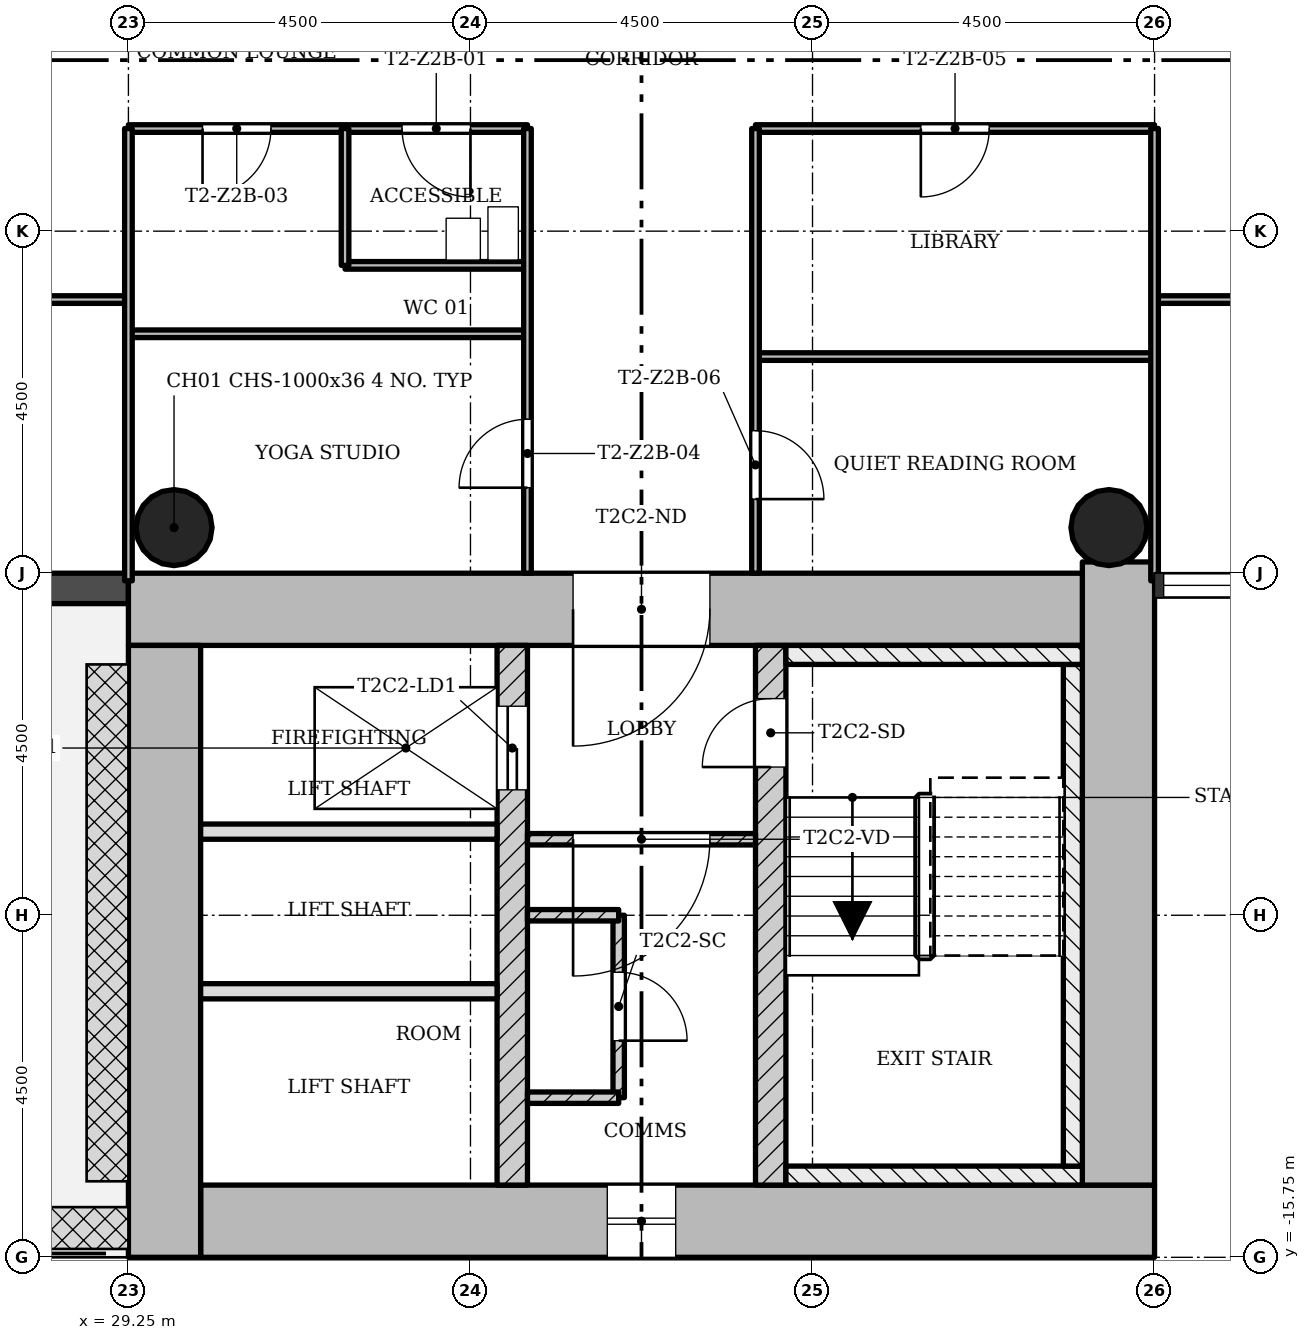
"""IFC4 building model, lengths in metres.
Left out: names, types, materials, properties, quantities, classifications, styles, units other than length and angle.
Written with IfcOpenShell. Run it as: python <this file> out.ifc"""

import sys

from ifc_helpers import new_model, si_unit, direction, frame, frame_2d, origin, origin_2d, place, context, subcontext, project, spatial, rectangle, hollow_circle, extrude, element, fill, save


model = new_model("IFC4")
c1 = context("Model", 3, precision=1e-05, world=origin(), true_north=direction((0.0, 1.0)))
c2 = subcontext(c1, "Body", "Model", "MODEL_VIEW")
j1 = project(units=[si_unit("LENGTHUNIT", "METRE"), si_unit("PLANEANGLEUNIT", "RADIAN")], contexts=[c1])
p1 = place(None, origin())
s1 = spatial("IfcSite", under=j1, at=p1, CompositionType="ELEMENT")
p2 = place(p1, origin())
s2 = spatial("IfcBuilding", under=s1, at=p2, CompositionType="ELEMENT")
p3 = place(p2, frame((0.0, 0.0, 83.4)))
s3 = spatial("IfcBuildingStorey", under=s2, at=p3, CompositionType="ELEMENT", Elevation=83.4)
p4 = place(p3, frame((30.2, -15.275, 0.0), z_axis=(0.0, 0.0, 1.0), x_axis=(1.0, 0.0, 0.0)))
e1 = element("IfcWall", 1, at=p4, inside=s3, PredefinedType="SHEAR", context=c2, shape_type="SweptSolid", body=[
    extrude(rectangle(XDim=12.55, YDim=0.95, at=frame_2d((6.275, 0.0))), origin(), (0.0, 0.0, 1.0), 3.4),
])
p5 = place(p4, frame((5.35, 0.0, 0.45)))
e2 = element("IfcOpeningElement", 2, at=p5, cuts=e1, PredefinedType="OPENING", context=c2, shape_type="SweptSolid", body=[
    extrude(rectangle(XDim=0.9, YDim=2.4, at=frame_2d((0.45, 1.2))), frame((0.0, 0.485, 0.0), z_axis=(0.0, -1.0, 0.0), x_axis=(1.0, 0.0, 0.0)), (0.0, 0.0, 1.0), 0.97),
])
p6 = place(p3, frame((42.275, -14.8, 0.0), z_axis=(0.0, 0.0, 1.0), x_axis=(0.0, 1.0, 0.0)))
e3 = element("IfcWall", 3, at=p6, inside=s3, PredefinedType="SHEAR", context=c2, shape_type="SweptSolid", body=[
    extrude(rectangle(XDim=8.198, YDim=0.95, at=frame_2d((4.099, 0.0))), origin(), (0.0, 0.0, 1.0), 3.4),
])
p7 = place(p3, frame((41.8, -7.225, 0.0), z_axis=(0.0, 0.0, 1.0), x_axis=(-1.0, 0.0, 0.0)))
e4 = element("IfcWall", 4, at=p7, inside=s3, PredefinedType="SHEAR", context=c2, shape_type="SweptSolid", body=[
    extrude(rectangle(XDim=12.55, YDim=0.95, at=frame_2d((6.275, 0.0))), origin(), (0.0, 0.0, 1.0), 3.4),
])
p8 = place(p7, frame((4.9, 0.0, 0.0)))
e5 = element("IfcOpeningElement", 5, at=p8, cuts=e4, PredefinedType="OPENING", context=c2, shape_type="SweptSolid", body=[
    extrude(rectangle(XDim=1.8, YDim=2.1, at=frame_2d((0.9, 1.05))), frame((0.0, 0.485, 0.0), z_axis=(0.0, -1.0, 0.0), x_axis=(1.0, 0.0, 0.0)), (0.0, 0.0, 1.0), 0.97),
])
p9 = place(p3, frame((29.725, -7.7, 0.0), z_axis=(0.0, 0.0, 1.0), x_axis=(0.0, -1.0, 0.0)))
e6 = element("IfcWall", 6, at=p9, inside=s3, PredefinedType="SHEAR", context=c2, shape_type="SweptSolid", body=[
    extrude(rectangle(XDim=8.05, YDim=0.95, at=frame_2d((4.025, 0.0))), origin(), (0.0, 0.0, 1.0), 3.4),
])
p10 = place(p3, frame((34.3, -14.8, 0.0), z_axis=(0.0, 0.0, 1.0), x_axis=(0.0, 1.0, 0.0)))
e7 = element("IfcWall", 7, at=p10, inside=s3, PredefinedType="SHEAR", context=c2, shape_type="SweptSolid", body=[
    extrude(rectangle(XDim=7.1, YDim=0.4, at=frame_2d((3.55, 0.0))), origin(), (0.0, 0.0, 1.0), 3.4),
])
p11 = place(p10, frame((5.2, 0.0, 0.0)))
e8 = element("IfcOpeningElement", 8, at=p11, cuts=e7, PredefinedType="OPENING", context=c2, shape_type="SweptSolid", body=[
    extrude(rectangle(XDim=1.1, YDim=2.1, at=frame_2d((0.55, 1.05))), frame((0.0, 0.21, 0.0), z_axis=(0.0, -1.0, 0.0), x_axis=(1.0, 0.0, 0.0)), (0.0, 0.0, 1.0), 0.42),
])
p12 = place(p3, frame((37.7, -14.8, 0.0), z_axis=(0.0, 0.0, 1.0), x_axis=(0.0, 1.0, 0.0)))
e9 = element("IfcWall", 9, at=p12, inside=s3, PredefinedType="SHEAR", context=c2, shape_type="SweptSolid", body=[
    extrude(rectangle(XDim=7.1, YDim=0.4, at=frame_2d((3.55, 0.0))), origin(), (0.0, 0.0, 1.0), 3.4),
])
p13 = place(p12, frame((5.5, 0.0, 0.0)))
e10 = element("IfcOpeningElement", 10, at=p13, cuts=e9, PredefinedType="OPENING", context=c2, shape_type="SweptSolid", body=[
    extrude(rectangle(XDim=0.9, YDim=2.1, at=frame_2d((0.45, 1.05))), frame((0.0, 0.21, 0.0), z_axis=(0.0, -1.0, 0.0), x_axis=(1.0, 0.0, 0.0)), (0.0, 0.0, 1.0), 0.42),
])
for number, where, z_axis, x_axis in (
    (11, (42.15, -6.15, 0.0), (0.0, 0.0, 1.0), (1.0, 0.0, 0.0)),
    (12, (29.85, -6.15, 0.0), (0.0, 0.0, 1.0), (1.0, 0.0, 0.0)),
):
    element("IfcColumn", number, at=place(p3, frame(where, z_axis=z_axis, x_axis=x_axis)), inside=s3, PredefinedType="COLUMN", context=c2, shape_type="SweptSolid", body=[
        extrude(hollow_circle(Radius=0.5, WallThickness=0.036, at=origin_2d()), origin(), (0.0, 0.0, 1.0), 3.4),
    ])
p14 = place(p3, frame((24.75, -6.95, -0.02), z_axis=(0.0, 0.0, 1.0), x_axis=(1.0, 0.0, 0.0)))
e13 = element("IfcWall", 13, at=p14, inside=s3, PredefinedType="STANDARD", context=c2, shape_type="SweptSolid", body=[
    extrude(rectangle(XDim=4.5, YDim=0.4, at=frame_2d((2.25, 0.0))), origin(), (0.0, 0.0, 1.0), 3.12),
])
p15 = place(p14, frame((1.35, 0.0, 0.02)))
e14 = element("IfcOpeningElement", 14, at=p15, cuts=e13, PredefinedType="OPENING", context=c2, shape_type="SweptSolid", body=[
    extrude(rectangle(XDim=1.8, YDim=2.1, at=frame_2d((0.9, 1.05))), frame((0.0, 0.21, 0.0), z_axis=(0.0, -1.0, 0.0), x_axis=(1.0, 0.0, 0.0)), (0.0, 0.0, 1.0), 0.42),
])
p16 = place(p3, frame((34.5, -10.25, 0.0), z_axis=(0.0, 0.0, 1.0), x_axis=(1.0, 0.0, 0.0)))
e15 = element("IfcWall", 15, at=p16, inside=s3, PredefinedType="PARTITIONING", context=c2, shape_type="SweptSolid", body=[
    extrude(rectangle(XDim=3.0, YDim=0.15, at=frame_2d((1.5, 0.0))), origin(), (0.0, 0.0, 1.0), 3.0),
])
p17 = place(p16, frame((0.6, 0.0, 0.0)))
e16 = element("IfcOpeningElement", 16, at=p17, cuts=e15, PredefinedType="OPENING", context=c2, shape_type="SweptSolid", body=[
    extrude(rectangle(XDim=1.8, YDim=2.1, at=frame_2d((0.9, 1.05))), frame((0.0, 0.085, 0.0), z_axis=(0.0, -1.0, 0.0), x_axis=(1.0, 0.0, 0.0)), (0.0, 0.0, 1.0), 0.17),
])
for number, where, z_axis, x_axis in (
    (17, (30.2, -10.15, 0.0), (0.0, 0.0, 1.0), (1.0, 0.0, 0.0)),
    (18, (30.2, -12.25, 0.0), (0.0, 0.0, 1.0), (1.0, 0.0, 0.0)),
):
    element("IfcWall", number, at=place(p3, frame(where, z_axis=z_axis, x_axis=x_axis)), inside=s3, PredefinedType="SOLIDWALL", context=c2, shape_type="SweptSolid", body=[
        extrude(rectangle(XDim=3.9, YDim=0.2, at=frame_2d((1.95, 0.0))), origin(), (0.0, 0.0, 1.0), 3.0),
    ])
p18 = place(p3, frame((35.7, -11.25, 0.0), z_axis=(0.0, 0.0, 1.0), x_axis=(0.0, -1.0, 0.0)))
e19 = element("IfcWall", 19, at=p18, inside=s3, PredefinedType="PARTITIONING", context=c2, shape_type="SweptSolid", body=[
    extrude(rectangle(XDim=2.4, YDim=0.15, at=frame_2d((1.2, 0.0))), origin(), (0.0, 0.0, 1.0), 3.0),
])
p19 = place(p18, frame((0.75, 0.0, 0.0)))
e20 = element("IfcOpeningElement", 20, at=p19, cuts=e19, PredefinedType="OPENING", context=c2, shape_type="SweptSolid", body=[
    extrude(rectangle(XDim=0.9, YDim=2.1, at=frame_2d((0.45, 1.05))), frame((0.0, 0.085, 0.0), z_axis=(0.0, -1.0, 0.0), x_axis=(1.0, 0.0, 0.0)), (0.0, 0.0, 1.0), 0.17),
])
for number, where, z_axis, x_axis in (
    (21, (35.7, -11.25, 0.0), (0.0, 0.0, 1.0), (-1.0, 0.0, 0.0)),
    (22, (35.7, -13.65, 0.0), (0.0, 0.0, 1.0), (-1.0, 0.0, 0.0)),
):
    element("IfcWall", number, at=place(p3, frame(where, z_axis=z_axis, x_axis=x_axis)), inside=s3, PredefinedType="PARTITIONING", context=c2, shape_type="SweptSolid", body=[
        extrude(rectangle(XDim=1.2, YDim=0.15, at=frame_2d((0.6, 0.0))), origin(), (0.0, 0.0, 1.0), 3.0),
    ])
for number, where, z_axis, x_axis in (
    (23, (42.75, -3.9, 0.0), (0.0, 0.0, 1.0), (-1.0, 0.0, 0.0)),
    (24, (34.5, -3.6, 0.0), (0.0, 0.0, 1.0), (-1.0, 0.0, 0.0)),
):
    element("IfcWall", number, at=place(p3, frame(where, z_axis=z_axis, x_axis=x_axis)), inside=s3, PredefinedType="PARTITIONING", context=c2, shape_type="SweptSolid", body=[
        extrude(rectangle(XDim=5.25, YDim=0.1, at=frame_2d((2.625, 0.0))), origin(), (0.0, 0.0, 1.0), 3.0),
    ])
p20 = place(p3, frame((51.75, -3.15, 0.0), z_axis=(0.0, 0.0, 1.0), x_axis=(-1.0, 0.0, 0.0)))
e25 = element("IfcWall", 25, at=p20, inside=s3, PredefinedType="PARTITIONING", context=c2, shape_type="SweptSolid", body=[
    extrude(rectangle(XDim=9.0, YDim=0.1, at=frame_2d((4.5, 0.0))), origin(), (0.0, 0.0, 1.0), 3.0),
])
p21 = place(p20, frame((5.55, 0.0, 0.0)))
e26 = element("IfcOpeningElement", 26, at=p21, cuts=e25, PredefinedType="OPENING", context=c2, shape_type="SweptSolid", body=[
    extrude(rectangle(XDim=0.9, YDim=2.1, at=frame_2d((0.45, 1.05))), frame((0.0, 0.06, 0.0), z_axis=(0.0, -1.0, 0.0), x_axis=(1.0, 0.0, 0.0)), (0.0, 0.0, 1.0), 0.12),
])
p22 = place(p3, frame((29.25, -3.15, 0.0), z_axis=(0.0, 0.0, 1.0), x_axis=(-1.0, 0.0, 0.0)))
e27 = element("IfcWall", 27, at=p22, inside=s3, PredefinedType="PARTITIONING", context=c2, shape_type="SweptSolid", body=[
    extrude(rectangle(XDim=9.0, YDim=0.1, at=frame_2d((4.5, 0.0))), origin(), (0.0, 0.0, 1.0), 3.0),
])
p23 = place(p22, frame((2.55, 0.0, 0.0)))
e28 = element("IfcOpeningElement", 28, at=p23, cuts=e27, PredefinedType="OPENING", context=c2, shape_type="SweptSolid", body=[
    extrude(rectangle(XDim=0.9, YDim=2.1, at=frame_2d((0.45, 1.05))), frame((0.0, 0.06, 0.0), z_axis=(0.0, -1.0, 0.0), x_axis=(1.0, 0.0, 0.0)), (0.0, 0.0, 1.0), 0.12),
])
p24 = place(p3, frame((34.5, -2.7, 0.0), z_axis=(0.0, 0.0, 1.0), x_axis=(-1.0, 0.0, 0.0)))
e29 = element("IfcWall", 29, at=p24, inside=s3, PredefinedType="PARTITIONING", context=c2, shape_type="SweptSolid", body=[
    extrude(rectangle(XDim=2.4, YDim=0.1, at=frame_2d((1.2, 0.0))), origin(), (0.0, 0.0, 1.0), 3.0),
])
p25 = place(p3, frame((42.75, -0.9, 0.0), z_axis=(0.0, 0.0, 1.0), x_axis=(-1.0, 0.0, 0.0)))
e30 = element("IfcWall", 30, at=p25, inside=s3, PredefinedType="PARTITIONING", context=c2, shape_type="SweptSolid", body=[
    extrude(rectangle(XDim=5.25, YDim=0.1, at=frame_2d((2.625, 0.0))), origin(), (0.0, 0.0, 1.0), 3.0),
])
p26 = place(p25, frame((2.175, 0.0, 0.0)))
e31 = element("IfcOpeningElement", 31, at=p26, cuts=e30, PredefinedType="OPENING", context=c2, shape_type="SweptSolid", body=[
    extrude(rectangle(XDim=0.9, YDim=2.1, at=frame_2d((0.45, 1.05))), frame((0.0, 0.06, 0.0), z_axis=(0.0, -1.0, 0.0), x_axis=(1.0, 0.0, 0.0)), (0.0, 0.0, 1.0), 0.12),
])
p27 = place(p3, frame((34.5, -0.9, 0.0), z_axis=(0.0, 0.0, 1.0), x_axis=(-1.0, 0.0, 0.0)))
e32 = element("IfcWall", 32, at=p27, inside=s3, PredefinedType="PARTITIONING", context=c2, shape_type="SweptSolid", body=[
    extrude(rectangle(XDim=5.25, YDim=0.1, at=frame_2d((2.625, 0.0))), origin(), (0.0, 0.0, 1.0), 3.0),
])
p28 = place(p27, frame((0.75, 0.0, 0.0)))
e33 = element("IfcOpeningElement", 33, at=p28, cuts=e32, PredefinedType="OPENING", context=c2, shape_type="SweptSolid", body=[
    extrude(rectangle(XDim=0.9, YDim=2.1, at=frame_2d((0.45, 1.05))), frame((0.0, 0.06, 0.0), z_axis=(0.0, -1.0, 0.0), x_axis=(1.0, 0.0, 0.0)), (0.0, 0.0, 1.0), 0.12),
])
p29 = place(p27, frame((3.375, 0.0, 0.0)))
e34 = element("IfcOpeningElement", 34, at=p29, cuts=e32, PredefinedType="OPENING", context=c2, shape_type="SweptSolid", body=[
    extrude(rectangle(XDim=0.9, YDim=2.1, at=frame_2d((0.45, 1.05))), frame((0.0, 0.06, 0.0), z_axis=(0.0, -1.0, 0.0), x_axis=(1.0, 0.0, 0.0)), (0.0, 0.0, 1.0), 0.12),
])
p30 = place(p3, frame((42.75, -6.85, 0.0), z_axis=(0.0, 0.0, 1.0), x_axis=(0.0, 1.0, 0.0)))
e35 = element("IfcWall", 35, at=p30, inside=s3, PredefinedType="PARTITIONING", context=c2, shape_type="SweptSolid", body=[
    extrude(rectangle(XDim=5.95, YDim=0.1, at=frame_2d((2.975, 0.0))), origin(), (0.0, 0.0, 1.0), 3.0),
])
p31 = place(p3, frame((37.5, -6.75, 0.0), z_axis=(0.0, 0.0, 1.0), x_axis=(0.0, 1.0, 0.0)))
e36 = element("IfcWall", 36, at=p31, inside=s3, PredefinedType="PARTITIONING", context=c2, shape_type="SweptSolid", body=[
    extrude(rectangle(XDim=5.85, YDim=0.1, at=frame_2d((2.925, 0.0))), origin(), (0.0, 0.0, 1.0), 3.0),
])
p32 = place(p31, frame((0.975, 0.0, 0.0)))
e37 = element("IfcOpeningElement", 37, at=p32, cuts=e36, PredefinedType="OPENING", context=c2, shape_type="SweptSolid", body=[
    extrude(rectangle(XDim=0.9, YDim=2.1, at=frame_2d((0.45, 1.05))), frame((0.0, 0.06, 0.0), z_axis=(0.0, -1.0, 0.0), x_axis=(1.0, 0.0, 0.0)), (0.0, 0.0, 1.0), 0.12),
])
p33 = place(p3, frame((34.5, -6.75, 0.0), z_axis=(0.0, 0.0, 1.0), x_axis=(0.0, 1.0, 0.0)))
e38 = element("IfcWall", 38, at=p33, inside=s3, PredefinedType="PARTITIONING", context=c2, shape_type="SweptSolid", body=[
    extrude(rectangle(XDim=5.85, YDim=0.1, at=frame_2d((2.925, 0.0))), origin(), (0.0, 0.0, 1.0), 3.0),
])
p34 = place(p33, frame((1.125, 0.0, 0.0)))
e39 = element("IfcOpeningElement", 39, at=p34, cuts=e38, PredefinedType="OPENING", context=c2, shape_type="SweptSolid", body=[
    extrude(rectangle(XDim=0.9, YDim=2.1, at=frame_2d((0.45, 1.05))), frame((0.0, 0.06, 0.0), z_axis=(0.0, -1.0, 0.0), x_axis=(1.0, 0.0, 0.0)), (0.0, 0.0, 1.0), 0.12),
])
p35 = place(p3, frame((32.1, -2.7, 0.0), z_axis=(0.0, 0.0, 1.0), x_axis=(0.0, 1.0, 0.0)))
e40 = element("IfcWall", 40, at=p35, inside=s3, PredefinedType="PARTITIONING", context=c2, shape_type="SweptSolid", body=[
    extrude(rectangle(XDim=1.8, YDim=0.1, at=frame_2d((0.9, 0.0))), origin(), (0.0, 0.0, 1.0), 3.0),
])
p36 = place(p3, frame((29.25, -6.85, 0.0), z_axis=(0.0, 0.0, 1.0), x_axis=(0.0, 1.0, 0.0)))
e41 = element("IfcWall", 41, at=p36, inside=s3, PredefinedType="PARTITIONING", context=c2, shape_type="SweptSolid", body=[
    extrude(rectangle(XDim=5.95, YDim=0.1, at=frame_2d((2.975, 0.0))), origin(), (0.0, 0.0, 1.0), 3.0),
])
p37 = place(p3, frame((37.9, -14.675, 0.0), z_axis=(0.0, 0.0, 1.0), x_axis=(1.0, 0.0, 0.0)))
e42 = element("IfcWall", 42, at=p37, inside=s3, PredefinedType="SHEAR", context=c2, shape_type="SweptSolid", body=[
    extrude(rectangle(XDim=3.9, YDim=0.25, at=frame_2d((1.95, 0.0))), origin(), (0.0, 0.0, 1.0), 3.4),
])
p38 = place(p3, frame((41.675, -7.95, 0.0), z_axis=(0.0, 0.0, 1.0), x_axis=(0.0, -1.0, 0.0)))
e43 = element("IfcWall", 43, at=p38, inside=s3, PredefinedType="SHEAR", context=c2, shape_type="SweptSolid", body=[
    extrude(rectangle(XDim=6.6, YDim=0.25, at=frame_2d((3.3, 0.0))), origin(), (0.0, 0.0, 1.0), 3.4),
])
p39 = place(p3, frame((37.9, -7.825, 0.0), z_axis=(0.0, 0.0, 1.0), x_axis=(1.0, 0.0, 0.0)))
e44 = element("IfcWall", 44, at=p39, inside=s3, PredefinedType="SHEAR", context=c2, shape_type="SweptSolid", body=[
    extrude(rectangle(XDim=3.9, YDim=0.25, at=frame_2d((1.95, 0.0))), origin(), (0.0, 0.0, 1.0), 3.4),
])
p40 = place(p5, origin())
e45 = element("IfcWindow", 45, at=p40, inside=s3, PartitioningType="SINGLE_PANEL", PredefinedType="WINDOW", context=c2, shape_type="SweptSolid", body=[
    extrude(rectangle(XDim=0.9, YDim=2.4, at=frame_2d((0.45, 1.2))), frame((0.0, 0.03, 0.0), z_axis=(0.0, -1.0, 0.0), x_axis=(1.0, 0.0, 0.0)), (0.0, 0.0, 1.0), 0.06),
])
fill(e2, e45)
p41 = place(p17, origin())
e46 = element("IfcDoor", 46, at=p41, inside=s3, OperationType="SINGLE_SWING_LEFT", PredefinedType="DOOR", context=c2, shape_type="SweptSolid", body=[
    extrude(rectangle(XDim=1.8, YDim=2.1, at=frame_2d((0.9, 1.05))), frame((0.0, 0.025, 0.0), z_axis=(0.0, -1.0, 0.0), x_axis=(1.0, 0.0, 0.0)), (0.0, 0.0, 1.0), 0.05),
])
fill(e16, e46)
p42 = place(p19, origin())
e47 = element("IfcDoor", 47, at=p42, inside=s3, OperationType="SINGLE_SWING_LEFT", PredefinedType="DOOR", context=c2, shape_type="SweptSolid", body=[
    extrude(rectangle(XDim=0.9, YDim=2.1, at=frame_2d((0.45, 1.05))), frame((0.0, 0.025, 0.0), z_axis=(0.0, -1.0, 0.0), x_axis=(1.0, 0.0, 0.0)), (0.0, 0.0, 1.0), 0.05),
])
fill(e20, e47)
p43 = place(p28, origin())
e48 = element("IfcDoor", 48, at=p43, inside=s3, OperationType="SINGLE_SWING_RIGHT", PredefinedType="DOOR", context=c2, shape_type="SweptSolid", body=[
    extrude(rectangle(XDim=0.9, YDim=2.1, at=frame_2d((0.45, 1.05))), frame((0.0, 0.025, 0.0), z_axis=(0.0, -1.0, 0.0), x_axis=(1.0, 0.0, 0.0)), (0.0, 0.0, 1.0), 0.05),
])
fill(e33, e48)
p44 = place(p29, origin())
e49 = element("IfcDoor", 49, at=p44, inside=s3, OperationType="SINGLE_SWING_LEFT", PredefinedType="DOOR", context=c2, shape_type="SweptSolid", body=[
    extrude(rectangle(XDim=0.9, YDim=2.1, at=frame_2d((0.45, 1.05))), frame((0.0, 0.025, 0.0), z_axis=(0.0, -1.0, 0.0), x_axis=(1.0, 0.0, 0.0)), (0.0, 0.0, 1.0), 0.05),
])
fill(e34, e49)
p45 = place(p34, origin())
e50 = element("IfcDoor", 50, at=p45, inside=s3, OperationType="SINGLE_SWING_RIGHT", PredefinedType="DOOR", context=c2, shape_type="SweptSolid", body=[
    extrude(rectangle(XDim=0.9, YDim=2.1, at=frame_2d((0.45, 1.05))), frame((0.0, 0.025, 0.0), z_axis=(0.0, -1.0, 0.0), x_axis=(1.0, 0.0, 0.0)), (0.0, 0.0, 1.0), 0.05),
])
fill(e39, e50)
p46 = place(p26, origin())
e51 = element("IfcDoor", 51, at=p46, inside=s3, OperationType="SINGLE_SWING_LEFT", PredefinedType="DOOR", context=c2, shape_type="SweptSolid", body=[
    extrude(rectangle(XDim=0.9, YDim=2.1, at=frame_2d((0.45, 1.05))), frame((0.0, 0.025, 0.0), z_axis=(0.0, -1.0, 0.0), x_axis=(1.0, 0.0, 0.0)), (0.0, 0.0, 1.0), 0.05),
])
fill(e31, e51)
p47 = place(p32, origin())
e52 = element("IfcDoor", 52, at=p47, inside=s3, OperationType="SINGLE_SWING_LEFT", PredefinedType="DOOR", context=c2, shape_type="SweptSolid", body=[
    extrude(rectangle(XDim=0.9, YDim=2.1, at=frame_2d((0.45, 1.05))), frame((0.0, 0.025, 0.0), z_axis=(0.0, -1.0, 0.0), x_axis=(1.0, 0.0, 0.0)), (0.0, 0.0, 1.0), 0.05),
])
fill(e37, e52)
p48 = place(p13, origin())
e53 = element("IfcDoor", 53, at=p48, inside=s3, OperationType="SINGLE_SWING_RIGHT", PredefinedType="DOOR", context=c2, shape_type="SweptSolid", body=[
    extrude(rectangle(XDim=0.9, YDim=2.1, at=frame_2d((0.45, 1.05))), frame((0.0, 0.025, 0.0), z_axis=(0.0, -1.0, 0.0), x_axis=(1.0, 0.0, 0.0)), (0.0, 0.0, 1.0), 0.05),
])
fill(e10, e53)
p49 = place(p11, origin())
e54 = element("IfcDoor", 54, at=p49, inside=s3, OperationType="SLIDING_TO_LEFT", PredefinedType="DOOR", context=c2, shape_type="SweptSolid", body=[
    extrude(rectangle(XDim=1.1, YDim=2.1, at=frame_2d((0.55, 1.05))), frame((0.0, 0.025, 0.0), z_axis=(0.0, -1.0, 0.0), x_axis=(1.0, 0.0, 0.0)), (0.0, 0.0, 1.0), 0.05),
])
fill(e8, e54)
p50 = place(p8, origin())
e55 = element("IfcDoor", 55, at=p50, inside=s3, OperationType="SINGLE_SWING_LEFT", PredefinedType="DOOR", context=c2, shape_type="SweptSolid", body=[
    extrude(rectangle(XDim=1.8, YDim=2.1, at=frame_2d((0.9, 1.05))), frame((0.0, 0.025, 0.0), z_axis=(0.0, -1.0, 0.0), x_axis=(1.0, 0.0, 0.0)), (0.0, 0.0, 1.0), 0.05),
])
fill(e5, e55)
save(model, sys.argv[1])
